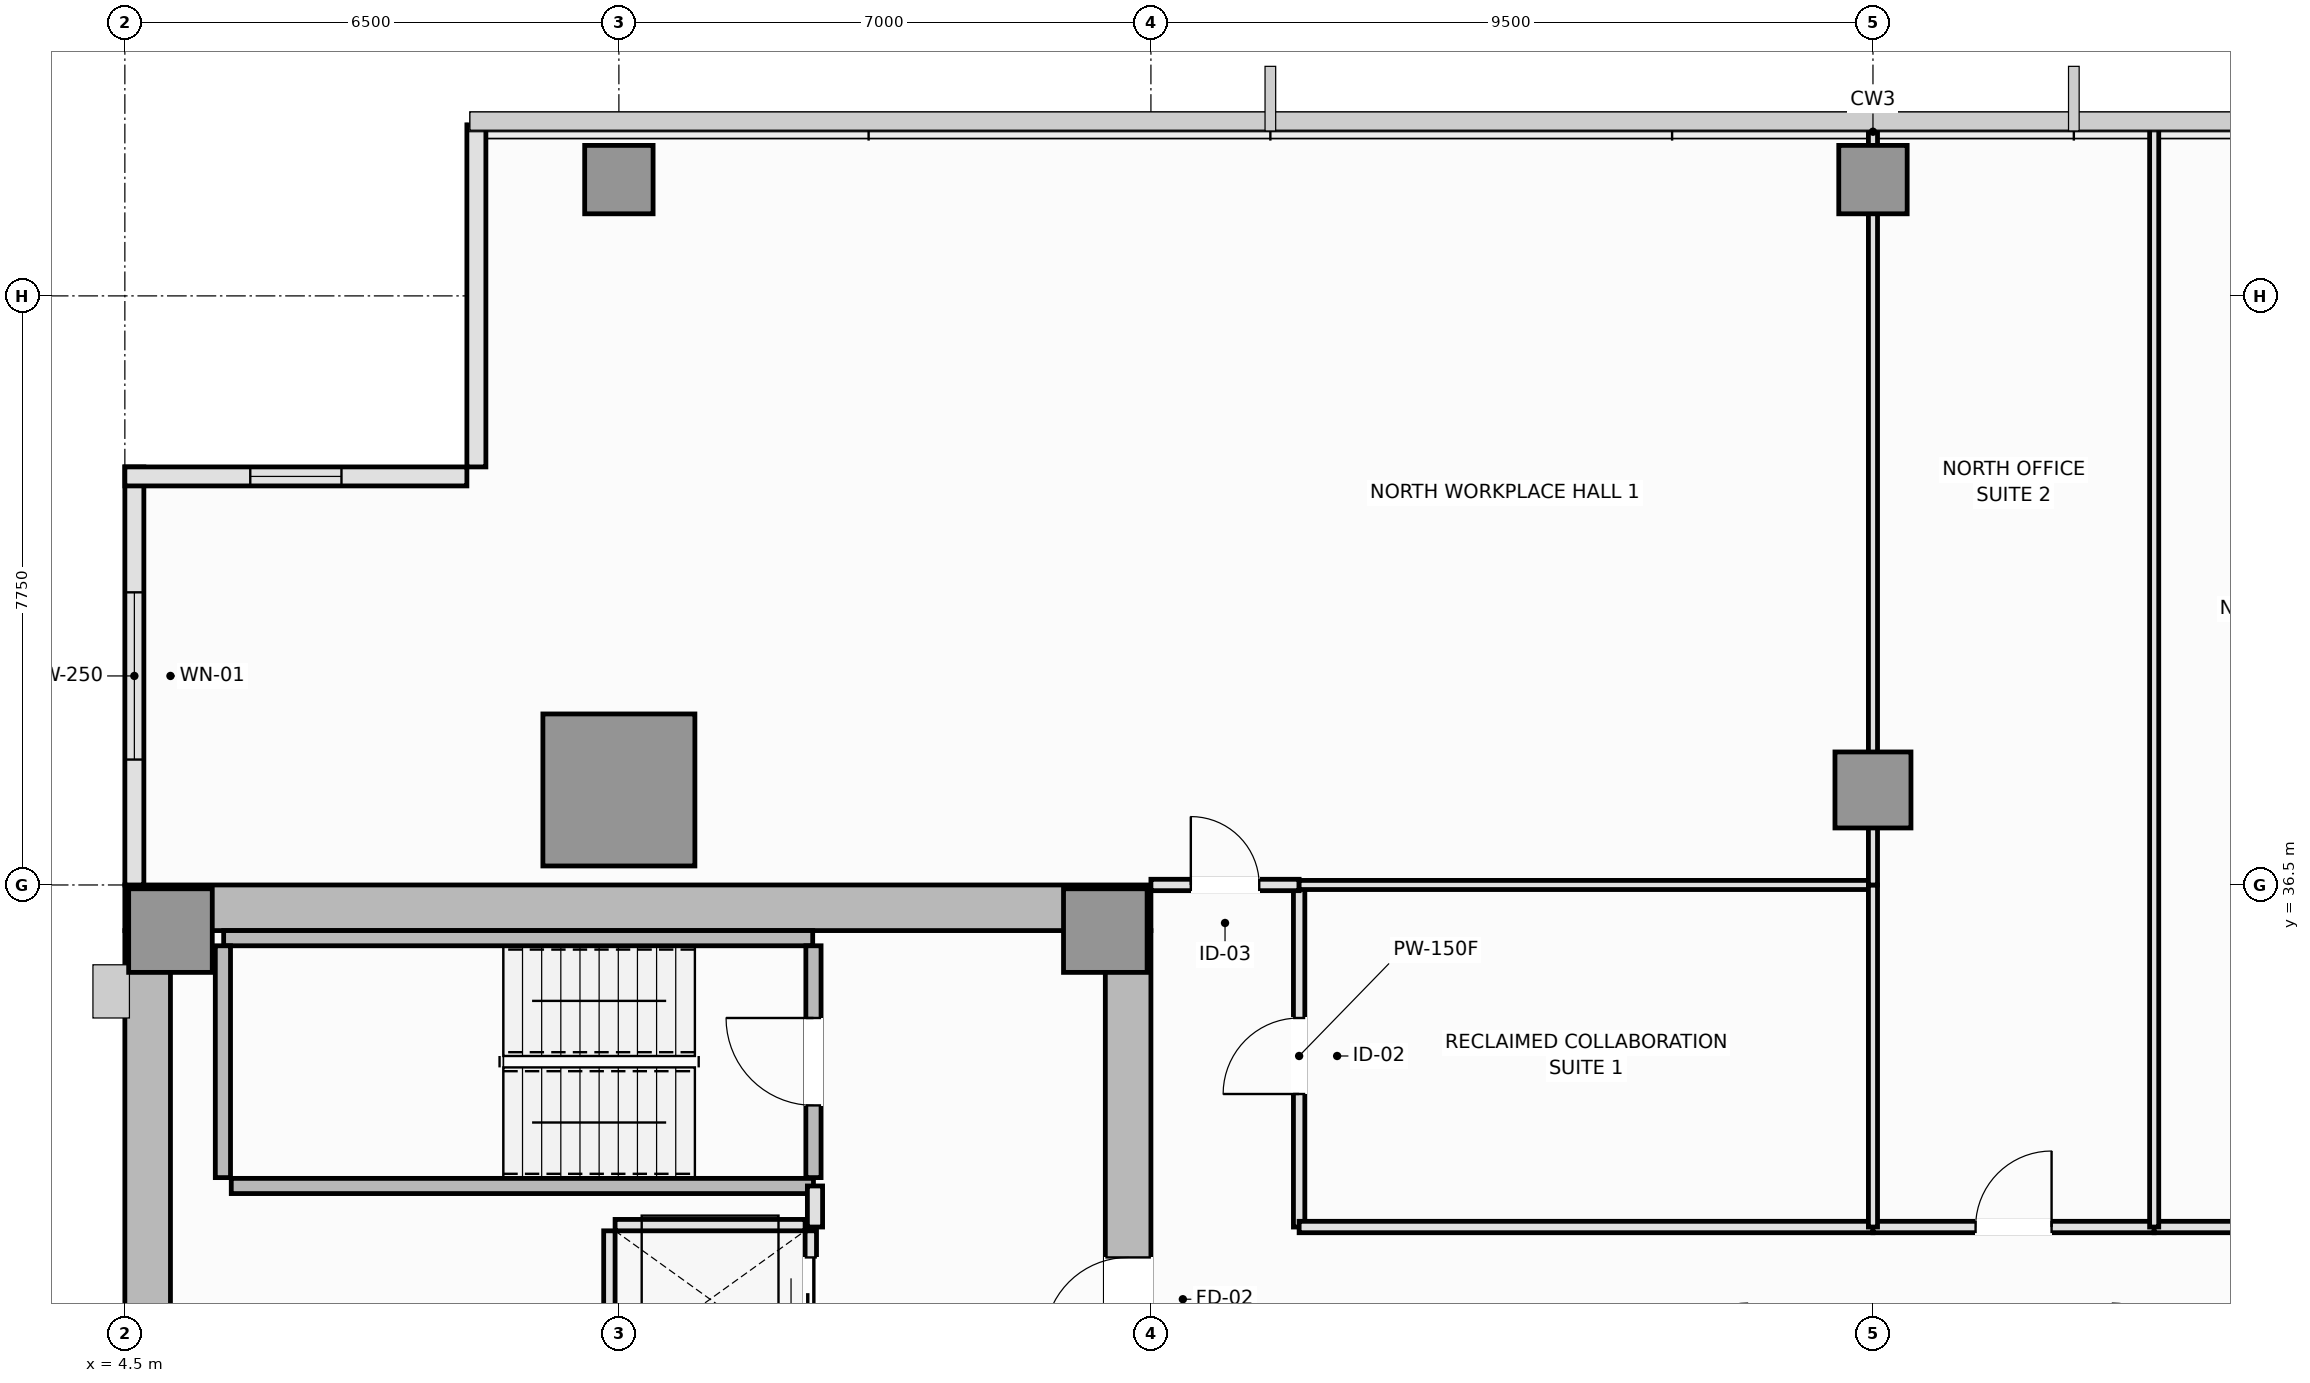
"""IFC4 building model, lengths in metres.
Left out: names, types, materials, properties, quantities, classifications, styles, units other than length and angle.
Written with IfcOpenShell. Run it as: python <this file> out.ifc"""

import sys

from ifc_helpers import new_model, si_unit, direction, frame, frame_2d, origin, origin_2d, place, context, subcontext, project, spatial, rectangle, extrude, element, fill, save


model = new_model("IFC4")
c1 = context("Model", 3, precision=1e-05, world=origin(), true_north=direction((0.0, 1.0)))
c2 = subcontext(c1, "Body", "Model", "MODEL_VIEW")
j1 = project(units=[si_unit("LENGTHUNIT", "METRE"), si_unit("PLANEANGLEUNIT", "RADIAN")], contexts=[c1])
p1 = place(None, origin())
s1 = spatial("IfcSite", under=j1, at=p1, CompositionType="ELEMENT")
p2 = place(p1, origin())
s2 = spatial("IfcBuilding", under=s1, at=p2, CompositionType="ELEMENT")
p3 = place(p2, frame((0.0, 0.0, 148.4)))
s3 = spatial("IfcBuildingStorey", under=s2, at=p3, CompositionType="ELEMENT", Elevation=148.4)
p4 = place(p3, frame((4.5, 36.2, 0.0), z_axis=(0.0, 0.0, 1.0), x_axis=(1.0, 0.0, 0.0)))
e1 = element("IfcWall", 1, at=p4, inside=s3, PredefinedType="SHEAR", context=c2, shape_type="SweptSolid", body=[
    extrude(rectangle(XDim=13.5, YDim=0.6, at=frame_2d((6.75, 0.0))), origin(), (0.0, 0.0, 1.0), 3.55),
])
p5 = place(p3, frame((4.8, 14.6, 0.0), z_axis=(0.0, 0.0, 1.0), x_axis=(0.0, 1.0, 0.0)))
e2 = element("IfcWall", 2, at=p5, inside=s3, PredefinedType="SHEAR", context=c2, shape_type="SweptSolid", body=[
    extrude(rectangle(XDim=21.3, YDim=0.6, at=frame_2d((10.65, 0.0))), origin(), (0.0, 0.0, 1.0), 3.55),
])
p6 = place(p3, frame((17.7, 27.05, 0.0), z_axis=(0.0, 0.0, 1.0), x_axis=(0.0, 1.0, 0.0)))
e3 = element("IfcWall", 3, at=p6, inside=s3, PredefinedType="SHEAR", context=c2, shape_type="SweptSolid", body=[
    extrude(rectangle(XDim=8.85, YDim=0.6, at=frame_2d((4.425, 0.0))), origin(), (0.0, 0.0, 1.0), 3.55),
])
p7 = place(p6, frame((3.45, 0.0, 0.0)))
e4 = element("IfcOpeningElement", 4, at=p7, cuts=e3, PredefinedType="OPENING", context=c2, shape_type="SweptSolid", body=[
    extrude(rectangle(XDim=1.1, YDim=2.15, at=frame_2d((0.55, 1.075))), frame((0.0, 0.31, 0.0), z_axis=(0.0, -1.0, 0.0), x_axis=(1.0, 0.0, 0.0)), (0.0, 0.0, 1.0), 0.62),
])
for number, where, z_axis, x_axis in (
    (5, (5.1, 35.9, 0.0), (0.0, 0.0, 1.0), (1.0, 0.0, 0.0)),
    (6, (17.4, 35.9, 0.0), (0.0, 0.0, 1.0), (1.0, 0.0, 0.0)),
):
    element("IfcColumn", number, at=place(p3, frame(where, z_axis=z_axis, x_axis=x_axis)), inside=s3, PredefinedType="PILASTER", context=c2, shape_type="SweptSolid", body=[
        extrude(rectangle(XDim=1.1, YDim=1.1, at=origin_2d()), origin(), (0.0, 0.0, 1.0), 3.55),
    ])
p8 = place(p3, frame((11.0, 37.75, 0.0), z_axis=(0.0, 0.0, 1.0), x_axis=(1.0, 0.0, 0.0)))
e7 = element("IfcColumn", 7, at=p8, inside=s3, PredefinedType="COLUMN", context=c2, shape_type="SweptSolid", body=[
    extrude(rectangle(XDim=2.0, YDim=2.0, at=origin_2d()), origin(), (0.0, 0.0, 1.0), 3.55),
])
p9 = place(p3, frame((27.5, 37.75, 0.0), z_axis=(0.0, 0.0, 1.0), x_axis=(1.0, 0.0, 0.0)))
e8 = element("IfcColumn", 8, at=p9, inside=s3, PredefinedType="COLUMN", context=c2, shape_type="SweptSolid", body=[
    extrude(rectangle(XDim=1.0, YDim=1.0, at=origin_2d()), origin(), (0.0, 0.0, 1.0), 3.55),
])
for number, where, z_axis, x_axis in (
    (9, (11.0, 45.78, 0.0), (0.0, 0.0, 1.0), (1.0, 0.0, 0.0)),
    (10, (27.5, 45.78, 0.0), (0.0, 0.0, 1.0), (1.0, 0.0, 0.0)),
):
    element("IfcColumn", number, at=place(p3, frame(where, z_axis=z_axis, x_axis=x_axis)), inside=s3, PredefinedType="COLUMN", context=c2, shape_type="SweptSolid", body=[
        extrude(rectangle(XDim=0.9, YDim=0.9, at=origin_2d()), origin(), (0.0, 0.0, 1.0), 3.55),
    ])
p10 = place(p3, frame((4.625, 42.0, 0.0), z_axis=(0.0, 0.0, 1.0), x_axis=(0.0, -1.0, 0.0)))
e11 = element("IfcWall", 11, at=p10, inside=s3, PredefinedType="SOLIDWALL", context=c2, shape_type="SweptSolid", body=[
    extrude(rectangle(XDim=5.5, YDim=0.25, at=frame_2d((2.75, 0.0))), origin(), (0.0, 0.0, 1.0), 3.37),
])
p11 = place(p10, frame((1.65, 0.0, 0.9)))
e12 = element("IfcOpeningElement", 12, at=p11, cuts=e11, PredefinedType="OPENING", context=c2, shape_type="SweptSolid", body=[
    extrude(rectangle(XDim=2.2, YDim=1.8, at=frame_2d((1.1, 0.9))), frame((0.0, 0.135, 0.0), z_axis=(0.0, -1.0, 0.0), x_axis=(1.0, 0.0, 0.0)), (0.0, 0.0, 1.0), 0.27),
])
p12 = place(p3, frame((9.125, 46.5, 0.0), z_axis=(0.0, 0.0, 1.0), x_axis=(0.0, -1.0, 0.0)))
e13 = element("IfcWall", 13, at=p12, inside=s3, PredefinedType="SOLIDWALL", context=c2, shape_type="SweptSolid", body=[
    extrude(rectangle(XDim=4.5, YDim=0.25, at=frame_2d((2.25, 0.0))), origin(), (0.0, 0.0, 1.0), 3.37),
])
p13 = place(p3, frame((9.0, 41.875, 0.0), z_axis=(0.0, 0.0, 1.0), x_axis=(-1.0, 0.0, 0.0)))
e14 = element("IfcWall", 14, at=p13, inside=s3, PredefinedType="SOLIDWALL", context=c2, shape_type="SweptSolid", body=[
    extrude(rectangle(XDim=4.5, YDim=0.25, at=frame_2d((2.25, 0.0))), origin(), (0.0, 0.0, 1.0), 3.37),
])
p14 = place(p13, frame((1.65, 0.0, 0.9)))
e15 = element("IfcOpeningElement", 15, at=p14, cuts=e14, PredefinedType="OPENING", context=c2, shape_type="SweptSolid", body=[
    extrude(rectangle(XDim=1.2, YDim=1.8, at=frame_2d((0.6, 0.9))), frame((0.0, 0.135, 0.0), z_axis=(0.0, -1.0, 0.0), x_axis=(1.0, 0.0, 0.0)), (0.0, 0.0, 1.0), 0.27),
])
p15 = place(p3, frame((5.8, 35.8, 0.0), z_axis=(0.0, 0.0, 1.0), x_axis=(1.0, 0.0, 0.0)))
e16 = element("IfcWall", 16, at=p15, inside=s3, PredefinedType="SOLIDWALL", context=c2, shape_type="SweptSolid", body=[
    extrude(rectangle(XDim=7.75, YDim=0.2, at=frame_2d((3.875, 0.0))), origin(), (0.0, 0.0, 1.0), 3.55),
])
p16 = place(p3, frame((5.79, 32.65, 0.0), z_axis=(0.0, 0.0, 1.0), x_axis=(0.0, 1.0, 0.0)))
e17 = element("IfcWall", 17, at=p16, inside=s3, PredefinedType="SOLIDWALL", context=c2, shape_type="SweptSolid", body=[
    extrude(rectangle(XDim=3.05, YDim=0.2, at=frame_2d((1.525, 0.0))), origin(), (0.0, 0.0, 1.0), 3.55),
])
p17 = place(p3, frame((5.9, 32.54, 0.0), z_axis=(0.0, 0.0, 1.0), x_axis=(1.0, 0.0, 0.0)))
e18 = element("IfcWall", 18, at=p17, inside=s3, PredefinedType="SOLIDWALL", context=c2, shape_type="SweptSolid", body=[
    extrude(rectangle(XDim=7.66, YDim=0.2, at=frame_2d((3.83, 0.0))), origin(), (0.0, 0.0, 1.0), 3.55),
])
p18 = place(p3, frame((13.56, 32.65, 0.0), z_axis=(0.0, 0.0, 1.0), x_axis=(0.0, 1.0, 0.0)))
e19 = element("IfcWall", 19, at=p18, inside=s3, PredefinedType="SOLIDWALL", context=c2, shape_type="SweptSolid", body=[
    extrude(rectangle(XDim=3.05, YDim=0.2, at=frame_2d((1.525, 0.0))), origin(), (0.0, 0.0, 1.0), 3.55),
])
p19 = place(p18, frame((0.95, 0.0, 0.0)))
e20 = element("IfcOpeningElement", 20, at=p19, cuts=e19, PredefinedType="OPENING", context=c2, shape_type="SweptSolid", body=[
    extrude(rectangle(XDim=1.15, YDim=2.15, at=frame_2d((0.575, 1.075))), frame((0.0, 0.11, 0.0), z_axis=(0.0, -1.0, 0.0), x_axis=(1.0, 0.0, 0.0)), (0.0, 0.0, 1.0), 0.22),
])
p20 = place(p3, frame((10.95, 32.025, 0.0), z_axis=(0.0, 0.0, 1.0), x_axis=(1.0, 0.0, 0.0)))
e21 = element("IfcWall", 21, at=p20, inside=s3, PredefinedType="PARTITIONING", context=c2, shape_type="SweptSolid", body=[
    extrude(rectangle(XDim=2.5, YDim=0.15, at=frame_2d((1.25, 0.0))), origin(), (0.0, 0.0, 1.0), 3.37),
])
p21 = place(p3, frame((10.875, 30.15, 0.0), z_axis=(0.0, 0.0, 1.0), x_axis=(0.0, 1.0, 0.0)))
e22 = element("IfcWall", 22, at=p21, inside=s3, PredefinedType="PARTITIONING", context=c2, shape_type="SweptSolid", body=[
    extrude(rectangle(XDim=1.8, YDim=0.15, at=frame_2d((0.9, 0.0))), origin(), (0.0, 0.0, 1.0), 3.37),
])
p22 = place(p3, frame((13.525, 30.15, 0.0), z_axis=(0.0, 0.0, 1.0), x_axis=(0.0, 1.0, 0.0)))
e23 = element("IfcWall", 23, at=p22, inside=s3, PredefinedType="PARTITIONING", context=c2, shape_type="SweptSolid", body=[
    extrude(rectangle(XDim=1.8, YDim=0.15, at=frame_2d((0.9, 0.0))), origin(), (0.0, 0.0, 1.0), 3.37),
])
p23 = place(p22, frame((0.35, 0.0, 0.0)))
e24 = element("IfcOpeningElement", 24, at=p23, cuts=e23, PredefinedType="OPENING", context=c2, shape_type="SweptSolid", body=[
    extrude(rectangle(XDim=1.1, YDim=2.2, at=frame_2d((0.55, 1.1))), frame((0.0, 0.085, 0.0), z_axis=(0.0, -1.0, 0.0), x_axis=(1.0, 0.0, 0.0)), (0.0, 0.0, 1.0), 0.17),
])
p24 = place(p3, frame((13.58, 32.0, 0.0), z_axis=(0.0, 0.0, 1.0), x_axis=(0.0, 1.0, 0.0)))
e25 = element("IfcWall", 25, at=p24, inside=s3, PredefinedType="PARTITIONING", context=c2, shape_type="SweptSolid", body=[
    extrude(rectangle(XDim=0.54, YDim=0.2, at=frame_2d((0.27, 0.0))), origin(), (0.0, 0.0, 1.0), 3.37),
])
p25 = place(p3, frame((19.95, 32.0, 0.0), z_axis=(0.0, 0.0, 1.0), x_axis=(0.0, 1.0, 0.0)))
e26 = element("IfcWall", 26, at=p25, inside=s3, PredefinedType="PARTITIONING", context=c2, shape_type="SweptSolid", body=[
    extrude(rectangle(XDim=4.5, YDim=0.15, at=frame_2d((2.25, 0.0))), origin(), (0.0, 0.0, 1.0), 3.37),
])
p26 = place(p25, frame((1.75, 0.0, 0.0)))
e27 = element("IfcOpeningElement", 27, at=p26, cuts=e26, PredefinedType="OPENING", context=c2, shape_type="SweptSolid", body=[
    extrude(rectangle(XDim=1.0, YDim=2.15, at=frame_2d((0.5, 1.075))), frame((0.0, 0.085, 0.0), z_axis=(0.0, -1.0, 0.0), x_axis=(1.0, 0.0, 0.0)), (0.0, 0.0, 1.0), 0.17),
])
p27 = place(p3, frame((18.0, 36.5, 0.0), z_axis=(0.0, 0.0, 1.0), x_axis=(1.0, 0.0, 0.0)))
e28 = element("IfcWall", 28, at=p27, inside=s3, PredefinedType="PARTITIONING", context=c2, shape_type="SweptSolid", body=[
    extrude(rectangle(XDim=1.95, YDim=0.15, at=frame_2d((0.975, 0.0))), origin(), (0.0, 0.0, 1.0), 3.37),
])
p28 = place(p27, frame((0.525, 0.0, 0.0)))
e29 = element("IfcOpeningElement", 29, at=p28, cuts=e28, PredefinedType="OPENING", context=c2, shape_type="SweptSolid", body=[
    extrude(rectangle(XDim=0.9, YDim=2.1, at=frame_2d((0.45, 1.05))), frame((0.0, 0.085, 0.0), z_axis=(0.0, -1.0, 0.0), x_axis=(1.0, 0.0, 0.0)), (0.0, 0.0, 1.0), 0.17),
])
p29 = place(p3, frame((19.95, 32.0, 0.0), z_axis=(0.0, 0.0, 1.0), x_axis=(1.0, 0.0, 0.0)))
e30 = element("IfcWall", 30, at=p29, inside=s3, PredefinedType="PARTITIONING", context=c2, shape_type="SweptSolid", body=[
    extrude(rectangle(XDim=7.55, YDim=0.15, at=frame_2d((3.775, 0.0))), origin(), (0.0, 0.0, 1.0), 2.77),
])
p30 = place(p3, frame((27.5, 32.0, 0.0), z_axis=(0.0, 0.0, 1.0), x_axis=(1.0, 0.0, 0.0)))
e31 = element("IfcWall", 31, at=p30, inside=s3, PredefinedType="PARTITIONING", context=c2, shape_type="SweptSolid", body=[
    extrude(rectangle(XDim=3.7, YDim=0.15, at=frame_2d((1.85, 0.0))), origin(), (0.0, 0.0, 1.0), 2.77),
])
p31 = place(p30, frame((1.35, 0.0, 0.0)))
e32 = element("IfcOpeningElement", 32, at=p31, cuts=e31, PredefinedType="OPENING", context=c2, shape_type="SweptSolid", body=[
    extrude(rectangle(XDim=1.0, YDim=2.15, at=frame_2d((0.5, 1.075))), frame((0.0, 0.085, 0.0), z_axis=(0.0, -1.0, 0.0), x_axis=(1.0, 0.0, 0.0)), (0.0, 0.0, 1.0), 0.17),
])
p32 = place(p3, frame((31.2, 32.0, 0.0), z_axis=(0.0, 0.0, 1.0), x_axis=(1.0, 0.0, 0.0)))
e33 = element("IfcWall", 33, at=p32, inside=s3, PredefinedType="PARTITIONING", context=c2, shape_type="SweptSolid", body=[
    extrude(rectangle(XDim=3.6, YDim=0.15, at=frame_2d((1.8, 0.0))), origin(), (0.0, 0.0, 1.0), 2.77),
])
p33 = place(p32, frame((1.3, 0.0, 0.0)))
e34 = element("IfcOpeningElement", 34, at=p33, cuts=e33, PredefinedType="OPENING", context=c2, shape_type="SweptSolid", body=[
    extrude(rectangle(XDim=1.0, YDim=2.15, at=frame_2d((0.5, 1.075))), frame((0.0, 0.085, 0.0), z_axis=(0.0, -1.0, 0.0), x_axis=(1.0, 0.0, 0.0)), (0.0, 0.0, 1.0), 0.17),
])
p34 = place(p3, frame((19.95, 36.5, 0.0), z_axis=(0.0, 0.0, 1.0), x_axis=(1.0, 0.0, 0.0)))
e35 = element("IfcWall", 35, at=p34, inside=s3, PredefinedType="PARTITIONING", context=c2, shape_type="SweptSolid", body=[
    extrude(rectangle(XDim=7.55, YDim=0.12, at=frame_2d((3.775, 0.0))), origin(), (0.0, 0.0, 1.0), 3.37),
])
p35 = place(p3, frame((27.5, 32.0, 0.0), z_axis=(0.0, 0.0, 1.0), x_axis=(0.0, 1.0, 0.0)))
e36 = element("IfcWall", 36, at=p35, inside=s3, PredefinedType="PARTITIONING", context=c2, shape_type="SweptSolid", body=[
    extrude(rectangle(XDim=4.5, YDim=0.12, at=frame_2d((2.25, 0.0))), origin(), (0.0, 0.0, 1.0), 3.37),
])
p36 = place(p3, frame((27.5, 36.5, 0.0), z_axis=(0.0, 0.0, 1.0), x_axis=(0.0, 1.0, 0.0)))
e37 = element("IfcWall", 37, at=p36, inside=s3, PredefinedType="PARTITIONING", context=c2, shape_type="SweptSolid", body=[
    extrude(rectangle(XDim=9.99, YDim=0.12, at=frame_2d((4.995, 0.0))), origin(), (0.0, 0.0, 1.0), 2.87),
])
p37 = place(p3, frame((31.2, 32.0, 0.0), z_axis=(0.0, 0.0, 1.0), x_axis=(0.0, 1.0, 0.0)))
e38 = element("IfcWall", 38, at=p37, inside=s3, PredefinedType="PARTITIONING", context=c2, shape_type="SweptSolid", body=[
    extrude(rectangle(XDim=14.49, YDim=0.12, at=frame_2d((7.245, 0.0))), origin(), (0.0, 0.0, 1.0), 3.37),
])
p38 = place(p11, origin())
e39 = element("IfcWindow", 39, at=p38, inside=s3, PartitioningType="SINGLE_PANEL", PredefinedType="WINDOW", context=c2, shape_type="SweptSolid", body=[
    extrude(rectangle(XDim=2.2, YDim=1.8, at=frame_2d((1.1, 0.9))), frame((0.0, 0.03, 0.0), z_axis=(0.0, -1.0, 0.0), x_axis=(1.0, 0.0, 0.0)), (0.0, 0.0, 1.0), 0.06),
])
fill(e12, e39)
p39 = place(p14, origin())
e40 = element("IfcWindow", 40, at=p39, inside=s3, PartitioningType="SINGLE_PANEL", PredefinedType="WINDOW", context=c2, shape_type="SweptSolid", body=[
    extrude(rectangle(XDim=1.2, YDim=1.8, at=frame_2d((0.6, 0.9))), frame((0.0, 0.03, 0.0), z_axis=(0.0, -1.0, 0.0), x_axis=(1.0, 0.0, 0.0)), (0.0, 0.0, 1.0), 0.06),
])
fill(e15, e40)
p40 = place(p19, origin())
e41 = element("IfcDoor", 41, at=p40, inside=s3, OperationType="SINGLE_SWING_RIGHT", PredefinedType="DOOR", context=c2, shape_type="SweptSolid", body=[
    extrude(rectangle(XDim=1.15, YDim=2.15, at=frame_2d((0.575, 1.075))), frame((0.0, 0.025, 0.0), z_axis=(0.0, -1.0, 0.0), x_axis=(1.0, 0.0, 0.0)), (0.0, 0.0, 1.0), 0.05),
])
fill(e20, e41)
p41 = place(p23, origin())
e42 = element("IfcDoor", 42, at=p41, inside=s3, OperationType="DOUBLE_DOOR_SLIDING", PredefinedType="DOOR", context=c2, shape_type="SweptSolid", body=[
    extrude(rectangle(XDim=1.1, YDim=2.2, at=frame_2d((0.55, 1.1))), frame((0.0, 0.025, 0.0), z_axis=(0.0, -1.0, 0.0), x_axis=(1.0, 0.0, 0.0)), (0.0, 0.0, 1.0), 0.05),
])
fill(e24, e42)
p42 = place(p7, origin())
e43 = element("IfcDoor", 43, at=p42, inside=s3, OperationType="SINGLE_SWING_LEFT", PredefinedType="DOOR", context=c2, shape_type="SweptSolid", body=[
    extrude(rectangle(XDim=1.1, YDim=2.15, at=frame_2d((0.55, 1.075))), frame((0.0, 0.025, 0.0), z_axis=(0.0, -1.0, 0.0), x_axis=(1.0, 0.0, 0.0)), (0.0, 0.0, 1.0), 0.05),
])
fill(e4, e43)
p43 = place(p26, origin())
e44 = element("IfcDoor", 44, at=p43, inside=s3, OperationType="SINGLE_SWING_LEFT", PredefinedType="DOOR", context=c2, shape_type="SweptSolid", body=[
    extrude(rectangle(XDim=1.0, YDim=2.15, at=frame_2d((0.5, 1.075))), frame((0.0, 0.025, 0.0), z_axis=(0.0, -1.0, 0.0), x_axis=(1.0, 0.0, 0.0)), (0.0, 0.0, 1.0), 0.05),
])
fill(e27, e44)
p44 = place(p28, origin())
e45 = element("IfcDoor", 45, at=p44, inside=s3, OperationType="SINGLE_SWING_LEFT", PredefinedType="DOOR", context=c2, shape_type="SweptSolid", body=[
    extrude(rectangle(XDim=0.9, YDim=2.1, at=frame_2d((0.45, 1.05))), frame((0.0, 0.025, 0.0), z_axis=(0.0, -1.0, 0.0), x_axis=(1.0, 0.0, 0.0)), (0.0, 0.0, 1.0), 0.05),
])
fill(e29, e45)
p45 = place(p31, origin())
e46 = element("IfcDoor", 46, at=p45, inside=s3, OperationType="SINGLE_SWING_RIGHT", PredefinedType="DOOR", context=c2, shape_type="SweptSolid", body=[
    extrude(rectangle(XDim=1.0, YDim=2.15, at=frame_2d((0.5, 1.075))), frame((0.0, 0.025, 0.0), z_axis=(0.0, -1.0, 0.0), x_axis=(1.0, 0.0, 0.0)), (0.0, 0.0, 1.0), 0.05),
])
fill(e32, e46)
save(model, sys.argv[1])
